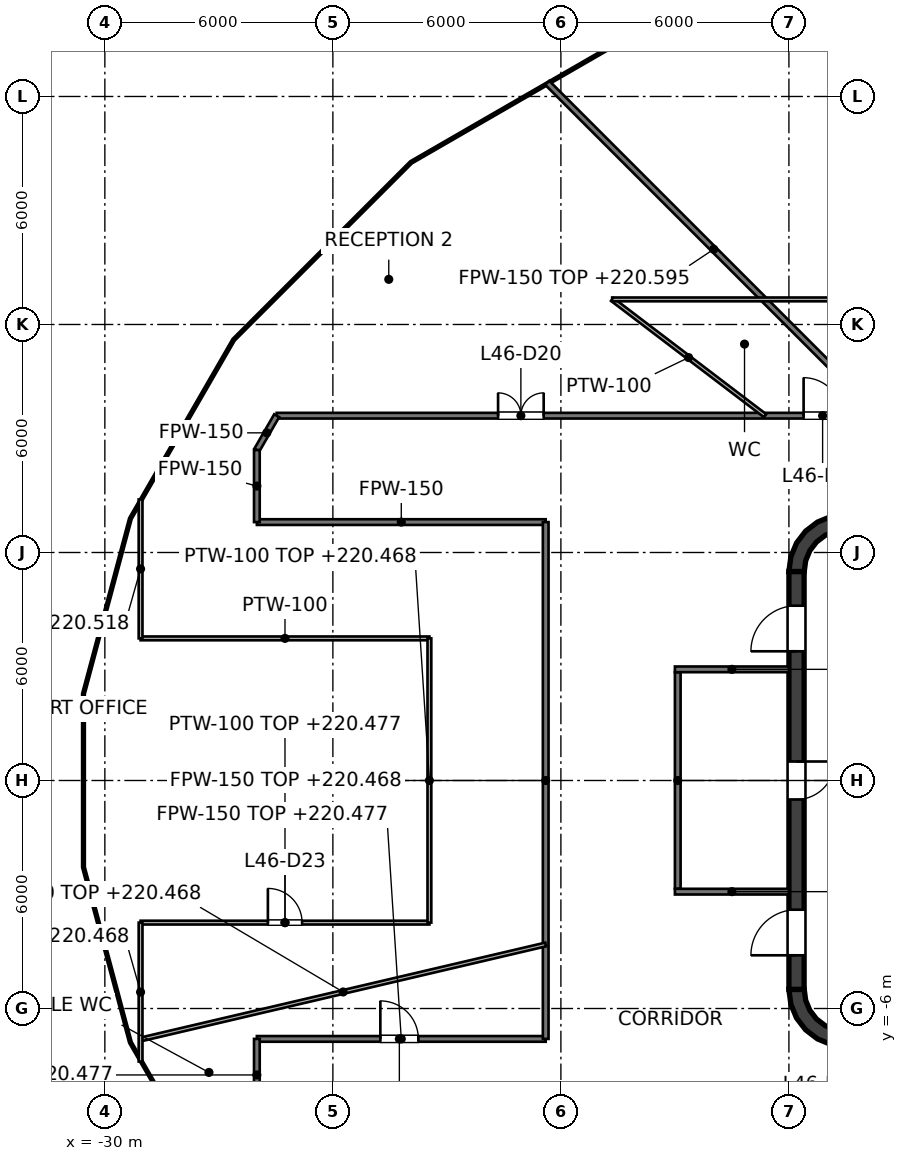
"""IFC4 building model, lengths in metres.
Left out: names, types, materials, properties, quantities, classifications, styles, units other than length and angle.
Written with IfcOpenShell. Run it as: python <this file> out.ifc"""

import sys

from ifc_helpers import new_model, si_unit, direction, frame, frame_2d, origin, place, context, subcontext, project, spatial, polyline, rectangle, outline, extrude, element, fill, save


model = new_model("IFC4")
c1 = context("Model", 3, precision=1e-05, world=origin(), true_north=direction((0.0, 1.0)))
c2 = subcontext(c1, "Body", "Model", "MODEL_VIEW")
j1 = project(units=[si_unit("LENGTHUNIT", "METRE"), si_unit("PLANEANGLEUNIT", "RADIAN")], contexts=[c1])
p1 = place(None, origin())
s1 = spatial("IfcSite", under=j1, at=p1, CompositionType="ELEMENT")
p2 = place(p1, origin())
s2 = spatial("IfcBuilding", under=s1, at=p2, CompositionType="ELEMENT")
p3 = place(p2, frame((0.0, 0.0, 217.6)))
s3 = spatial("IfcBuildingStorey", under=s2, at=p3, CompositionType="ELEMENT", Elevation=217.6)
p4 = place(p3, frame((-11.8, -5.5, 0.0), z_axis=(0.0, 0.0, 1.0), x_axis=(0.0, 1.0, 0.0)))
e1 = element("IfcWall", 1, at=p4, inside=s3, PredefinedType="SHEAR", context=c2, shape_type="SweptSolid", body=[
    extrude(rectangle(XDim=11.0, YDim=0.4, at=frame_2d((5.5, 0.0))), origin(), (0.0, 0.0, 1.0), 4.0),
])
p5 = place(p4, frame((5.0, 0.0, 0.0)))
e2 = element("IfcOpeningElement", 2, at=p5, cuts=e1, PredefinedType="OPENING", context=c2, shape_type="SweptSolid", body=[
    extrude(rectangle(XDim=1.0, YDim=2.1, at=frame_2d((0.5, 1.05))), frame((0.0, 0.2, 0.0), z_axis=(0.0, -1.0, 0.0), x_axis=(1.0, 0.0, 0.0)), (0.0, 0.0, 1.0), 0.4),
])
p6 = place(p4, frame((0.9, 0.0, 0.0)))
e3 = element("IfcOpeningElement", 3, at=p6, cuts=e1, PredefinedType="OPENING", context=c2, shape_type="SweptSolid", body=[
    extrude(rectangle(XDim=1.2, YDim=2.1, at=frame_2d((0.6, 1.05))), frame((0.0, 0.2, 0.0), z_axis=(0.0, -1.0, 0.0), x_axis=(1.0, 0.0, 0.0)), (0.0, 0.0, 1.0), 0.4),
])
p7 = place(p4, frame((8.9, 0.0, 0.0)))
e4 = element("IfcOpeningElement", 4, at=p7, cuts=e1, PredefinedType="OPENING", context=c2, shape_type="SweptSolid", body=[
    extrude(rectangle(XDim=1.2, YDim=2.1, at=frame_2d((0.6, 1.05))), frame((0.0, 0.2, 0.0), z_axis=(0.0, -1.0, 0.0), x_axis=(1.0, 0.0, 0.0)), (0.0, 0.0, 1.0), 0.4),
])
p8 = place(p3, origin())
e5 = element("IfcWall", 5, at=p8, inside=s3, PredefinedType="SHEAR", context=c2, shape_type="SweptSolid", body=[
    extrude(outline(polyline([(-12.0, 5.5), (-11.596, 5.5), (-11.559, 5.784), (-11.45, 6.048), (-11.275, 6.275), (-11.048, 6.45), (-10.784, 6.559), (-10.5, 6.596), (-10.5, 7.0), (-10.888, 6.949), (-11.25, 6.799), (-11.561, 6.561), (-11.799, 6.25), (-11.949, 5.888), (-12.0, 5.5)])), origin(), (0.0, 0.0, 1.0), 4.0),
])
e6 = element("IfcWall", 6, at=p8, inside=s3, PredefinedType="SHEAR", context=c2, shape_type="SweptSolid", body=[
    extrude(outline(polyline([(-10.5, -7.0), (-10.5, -6.596), (-10.784, -6.559), (-11.048, -6.45), (-11.275, -6.275), (-11.45, -6.048), (-11.559, -5.784), (-11.596, -5.5), (-12.0, -5.5), (-11.949, -5.888), (-11.799, -6.25), (-11.561, -6.561), (-11.25, -6.799), (-10.888, -6.949), (-10.5, -7.0)])), origin(), (0.0, 0.0, 1.0), 4.0),
])
p9 = place(p3, frame((-14.925, -2.85, 0.0), z_axis=(0.0, 0.0, 1.0), x_axis=(0.0, 1.0, 0.0)))
e7 = element("IfcWall", 7, at=p9, inside=s3, PredefinedType="PARTITIONING", context=c2, shape_type="SweptSolid", body=[
    extrude(rectangle(XDim=5.7, YDim=0.15, at=frame_2d((2.85, 0.0))), origin(), (0.0, 0.0, 1.0), 2.868),
])
p10 = place(p3, frame((-15.0, 2.925, 0.0), z_axis=(0.0, 0.0, 1.0), x_axis=(1.0, 0.0, 0.0)))
e8 = element("IfcWall", 8, at=p10, inside=s3, PredefinedType="PARTITIONING", context=c2, shape_type="SweptSolid", body=[
    extrude(rectangle(XDim=3.0, YDim=0.15, at=frame_2d((1.5, 0.0))), origin(), (0.0, 0.0, 1.0), 2.918),
])
p11 = place(p3, frame((-15.0, -2.925, 0.0), z_axis=(0.0, 0.0, 1.0), x_axis=(1.0, 0.0, 0.0)))
e9 = element("IfcWall", 9, at=p11, inside=s3, PredefinedType="PARTITIONING", context=c2, shape_type="SweptSolid", body=[
    extrude(rectangle(XDim=3.0, YDim=0.15, at=frame_2d((1.5, 0.0))), origin(), (0.0, 0.0, 1.0), 2.868),
])
p12 = place(p3, frame((-18.359, 18.359, 0.0), z_axis=(0.0, 0.0, 1.0), x_axis=(0.707106781187, -0.707106781187, 0.0)))
e10 = element("IfcWall", 10, at=p12, inside=s3, PredefinedType="PARTITIONING", context=c2, shape_type="SweptSolid", body=[
    extrude(rectangle(XDim=12.387, YDim=0.15, at=frame_2d((6.193, 0.0))), origin(), (0.0, 0.0, 1.0), 2.995),
])
p13 = place(p3, frame((-26.0, -6.8, 0.0), z_axis=(0.0, 0.0, 1.0), x_axis=(1.0, 0.0, 0.0)))
e11 = element("IfcWall", 11, at=p13, inside=s3, PredefinedType="PARTITIONING", context=c2, shape_type="SweptSolid", body=[
    extrude(rectangle(XDim=7.6, YDim=0.15, at=frame_2d((3.8, 0.0))), origin(), (0.0, 0.0, 1.0), 2.877),
])
p14 = place(p13, frame((3.249, 0.0, 0.0)))
e12 = element("IfcOpeningElement", 12, at=p14, cuts=e11, PredefinedType="OPENING", context=c2, shape_type="SweptSolid", body=[
    extrude(rectangle(XDim=1.0, YDim=2.1, at=frame_2d((0.5, 1.05))), frame((0.0, 0.075, 0.0), z_axis=(0.0, -1.0, 0.0), x_axis=(1.0, 0.0, 0.0)), (0.0, 0.0, 1.0), 0.15),
])
p15 = place(p3, frame((-26.0, 6.8, 0.0), z_axis=(0.0, 0.0, 1.0), x_axis=(1.0, 0.0, 0.0)))
e13 = element("IfcWall", 13, at=p15, inside=s3, PredefinedType="PARTITIONING", context=c2, shape_type="SweptSolid", body=[
    extrude(rectangle(XDim=7.6, YDim=0.15, at=frame_2d((3.8, 0.0))), origin(), (0.0, 0.0, 1.0), 2.927),
])
p16 = place(p3, frame((-25.479, 9.6, 0.0), z_axis=(0.0, 0.0, 1.0), x_axis=(1.0, 0.0, 0.0)))
e14 = element("IfcWall", 14, at=p16, inside=s3, PredefinedType="PARTITIONING", context=c2, shape_type="SweptSolid", body=[
    extrude(rectangle(XDim=50.958, YDim=0.15, at=frame_2d((25.479, 0.0))), origin(), (0.0, 0.0, 1.0), 2.918),
])
p17 = place(p16, frame((28.474, 0.0, 0.0)))
e15 = element("IfcOpeningElement", 15, at=p17, cuts=e14, PredefinedType="OPENING", context=c2, shape_type="SweptSolid", body=[
    extrude(rectangle(XDim=1.0, YDim=2.1, at=frame_2d((0.5, 1.05))), frame((0.0, 0.075, 0.0), z_axis=(0.0, -1.0, 0.0), x_axis=(1.0, 0.0, 0.0)), (0.0, 0.0, 1.0), 0.15),
])
p18 = place(p16, frame((24.607, 0.0, 0.0)))
e16 = element("IfcOpeningElement", 16, at=p18, cuts=e14, PredefinedType="OPENING", context=c2, shape_type="SweptSolid", body=[
    extrude(rectangle(XDim=1.0, YDim=2.1, at=frame_2d((0.5, 1.05))), frame((0.0, 0.075, 0.0), z_axis=(0.0, -1.0, 0.0), x_axis=(1.0, 0.0, 0.0)), (0.0, 0.0, 1.0), 0.15),
])
p19 = place(p16, frame((19.083, 0.0, 0.0)))
e17 = element("IfcOpeningElement", 17, at=p19, cuts=e14, PredefinedType="OPENING", context=c2, shape_type="SweptSolid", body=[
    extrude(rectangle(XDim=1.0, YDim=2.1, at=frame_2d((0.5, 1.05))), frame((0.0, 0.075, 0.0), z_axis=(0.0, -1.0, 0.0), x_axis=(1.0, 0.0, 0.0)), (0.0, 0.0, 1.0), 0.15),
])
p20 = place(p16, frame((13.865, 0.0, 0.0)))
e18 = element("IfcOpeningElement", 18, at=p20, cuts=e14, PredefinedType="OPENING", context=c2, shape_type="SweptSolid", body=[
    extrude(rectangle(XDim=1.0, YDim=2.1, at=frame_2d((0.5, 1.05))), frame((0.0, 0.075, 0.0), z_axis=(0.0, -1.0, 0.0), x_axis=(1.0, 0.0, 0.0)), (0.0, 0.0, 1.0), 0.15),
])
p21 = place(p16, frame((5.826, 0.0, 0.0)))
e19 = element("IfcOpeningElement", 19, at=p21, cuts=e14, PredefinedType="OPENING", context=c2, shape_type="SweptSolid", body=[
    extrude(rectangle(XDim=1.2, YDim=2.1, at=frame_2d((0.6, 1.05))), frame((0.0, 0.075, 0.0), z_axis=(0.0, -1.0, 0.0), x_axis=(1.0, 0.0, 0.0)), (0.0, 0.0, 1.0), 0.15),
])
p22 = place(p16, frame((38.532, 0.0, 0.0)))
e20 = element("IfcOpeningElement", 20, at=p22, cuts=e14, PredefinedType="OPENING", context=c2, shape_type="SweptSolid", body=[
    extrude(rectangle(XDim=1.0, YDim=2.1, at=frame_2d((0.5, 1.05))), frame((0.0, 0.075, 0.0), z_axis=(0.0, -1.0, 0.0), x_axis=(1.0, 0.0, 0.0)), (0.0, 0.0, 1.0), 0.15),
])
p23 = place(p3, frame((-26.0, 8.697, 0.0), z_axis=(0.0, 0.0, 1.0), x_axis=(0.499817072756, 0.866130991122, 0.0)))
e21 = element("IfcWall", 21, at=p23, inside=s3, PredefinedType="PARTITIONING", context=c2, shape_type="SweptSolid", body=[
    extrude(rectangle(XDim=1.042, YDim=0.15, at=frame_2d((0.521, 0.0))), origin(), (0.0, 0.0, 1.0), 2.927),
])
p24 = place(p3, frame((-18.4, -6.8, 0.0), z_axis=(0.0, 0.0, 1.0), x_axis=(0.0, 1.0, 0.0)))
e22 = element("IfcWall", 22, at=p24, inside=s3, PredefinedType="PARTITIONING", context=c2, shape_type="SweptSolid", body=[
    extrude(rectangle(XDim=13.6, YDim=0.15, at=frame_2d((6.8, 0.0))), origin(), (0.0, 0.0, 1.0), 2.868),
])
p25 = place(p3, frame((-26.0, -8.697, 0.0), z_axis=(0.0, 0.0, 1.0), x_axis=(0.0, 1.0, 0.0)))
e23 = element("IfcWall", 23, at=p25, inside=s3, PredefinedType="PARTITIONING", context=c2, shape_type="SweptSolid", body=[
    extrude(rectangle(XDim=1.897, YDim=0.15, at=frame_2d((0.948, 0.0))), origin(), (0.0, 0.0, 1.0), 2.877),
])
p26 = place(p3, frame((-26.0, 6.8, 0.0), z_axis=(0.0, 0.0, 1.0), x_axis=(0.0, 1.0, 0.0)))
e24 = element("IfcWall", 24, at=p26, inside=s3, PredefinedType="PARTITIONING", context=c2, shape_type="SweptSolid", body=[
    extrude(rectangle(XDim=1.897, YDim=0.15, at=frame_2d((0.948, 0.0))), origin(), (0.0, 0.0, 1.0), 2.927),
])
p27 = place(p3, frame((-16.651, 12.66, 0.0), z_axis=(0.0, 0.0, 1.0), x_axis=(0.796006750332, -0.605287744322, 0.0)))
e25 = element("IfcWall", 25, at=p27, inside=s3, PredefinedType="PARTITIONING", context=c2, shape_type="SweptSolid", body=[
    extrude(rectangle(XDim=5.055, YDim=0.1, at=frame_2d((2.528, 0.0))), origin(), (0.0, 0.0, 1.0), 2.927),
])
p28 = place(p3, frame((-29.06, -3.74, 0.0), z_axis=(0.0, 0.0, 1.0), x_axis=(1.0, 0.0, 0.0)))
e26 = element("IfcWall", 26, at=p28, inside=s3, PredefinedType="PARTITIONING", context=c2, shape_type="SweptSolid", body=[
    extrude(rectangle(XDim=7.6, YDim=0.1, at=frame_2d((3.8, 0.0))), origin(), (0.0, 0.0, 1.0), 2.877),
])
p29 = place(p28, frame((3.35, 0.0, 0.0)))
e27 = element("IfcOpeningElement", 27, at=p29, cuts=e26, PredefinedType="OPENING", context=c2, shape_type="SweptSolid", body=[
    extrude(rectangle(XDim=0.9, YDim=2.1, at=frame_2d((0.45, 1.05))), frame((0.0, 0.05, 0.0), z_axis=(0.0, -1.0, 0.0), x_axis=(1.0, 0.0, 0.0)), (0.0, 0.0, 1.0), 0.1),
])
p30 = place(p3, frame((-29.06, 3.74, 0.0), z_axis=(0.0, 0.0, 1.0), x_axis=(1.0, 0.0, 0.0)))
e28 = element("IfcWall", 28, at=p30, inside=s3, PredefinedType="PARTITIONING", context=c2, shape_type="SweptSolid", body=[
    extrude(rectangle(XDim=7.6, YDim=0.1, at=frame_2d((3.8, 0.0))), origin(), (0.0, 0.0, 1.0), 2.927),
])
p31 = place(p3, frame((-16.651, 12.66, 0.0), z_axis=(0.0, 0.0, 1.0), x_axis=(1.0, 0.0, 0.0)))
e29 = element("IfcWall", 29, at=p31, inside=s3, PredefinedType="PARTITIONING", context=c2, shape_type="SweptSolid", body=[
    extrude(rectangle(XDim=42.229, YDim=0.1, at=frame_2d((21.114, 0.0))), origin(), (0.0, 0.0, 1.0), 2.918),
])
p32 = place(p31, frame((8.027, 0.0, 0.0)))
e30 = element("IfcOpeningElement", 30, at=p32, cuts=e29, PredefinedType="OPENING", context=c2, shape_type="SweptSolid", body=[
    extrude(rectangle(XDim=1.8, YDim=2.1, at=frame_2d((0.9, 1.05))), frame((0.0, 0.05, 0.0), z_axis=(0.0, -1.0, 0.0), x_axis=(1.0, 0.0, 0.0)), (0.0, 0.0, 1.0), 0.1),
])
p33 = place(p31, frame((32.595, 0.0, 0.0)))
e31 = element("IfcOpeningElement", 31, at=p33, cuts=e29, PredefinedType="OPENING", context=c2, shape_type="SweptSolid", body=[
    extrude(rectangle(XDim=0.9, YDim=2.1, at=frame_2d((0.45, 1.05))), frame((0.0, 0.05, 0.0), z_axis=(0.0, -1.0, 0.0), x_axis=(1.0, 0.0, 0.0)), (0.0, 0.0, 1.0), 0.1),
])
p34 = place(p3, frame((-29.06, -6.815, 0.0), z_axis=(0.0, 0.0, 1.0), x_axis=(0.973585340427, 0.22832342172, 0.0)))
e32 = element("IfcWall", 32, at=p34, inside=s3, PredefinedType="PARTITIONING", context=c2, shape_type="SweptSolid", body=[
    extrude(rectangle(XDim=10.949, YDim=0.1, at=frame_2d((5.475, 0.0))), origin(), (0.0, 0.0, 1.0), 2.868),
])
p35 = place(p3, frame((-21.46, -3.74, 0.0), z_axis=(0.0, 0.0, 1.0), x_axis=(0.0, 1.0, 0.0)))
e33 = element("IfcWall", 33, at=p35, inside=s3, PredefinedType="PARTITIONING", context=c2, shape_type="SweptSolid", body=[
    extrude(rectangle(XDim=7.48, YDim=0.1, at=frame_2d((3.74, 0.0))), origin(), (0.0, 0.0, 1.0), 2.868),
])
p36 = place(p3, frame((-29.06, -7.396, 0.0), z_axis=(0.0, 0.0, 1.0), x_axis=(0.0, 1.0, 0.0)))
e34 = element("IfcWall", 34, at=p36, inside=s3, PredefinedType="PARTITIONING", context=c2, shape_type="SweptSolid", body=[
    extrude(rectangle(XDim=3.656, YDim=0.1, at=frame_2d((1.828, 0.0))), origin(), (0.0, 0.0, 1.0), 2.868),
])
p37 = place(p3, frame((-29.06, 3.74, 0.0), z_axis=(0.0, 0.0, 1.0), x_axis=(0.0, 1.0, 0.0)))
e35 = element("IfcWall", 35, at=p37, inside=s3, PredefinedType="PARTITIONING", context=c2, shape_type="SweptSolid", body=[
    extrude(rectangle(XDim=3.656, YDim=0.1, at=frame_2d((1.828, 0.0))), origin(), (0.0, 0.0, 1.0), 2.918),
])
p38 = place(p5, origin())
e36 = element("IfcDoor", 36, at=p38, inside=s3, OperationType="SINGLE_SWING_RIGHT", PredefinedType="DOOR", context=c2, shape_type="SweptSolid", body=[
    extrude(rectangle(XDim=1.0, YDim=2.1, at=frame_2d((0.5, 1.05))), frame((0.0, 0.025, 0.0), z_axis=(0.0, -1.0, 0.0), x_axis=(1.0, 0.0, 0.0)), (0.0, 0.0, 1.0), 0.05),
])
fill(e2, e36)
p39 = place(p6, origin())
e37 = element("IfcDoor", 37, at=p39, inside=s3, OperationType="SINGLE_SWING_LEFT", PredefinedType="DOOR", context=c2, shape_type="SweptSolid", body=[
    extrude(rectangle(XDim=1.2, YDim=2.1, at=frame_2d((0.6, 1.05))), frame((0.0, 0.025, 0.0), z_axis=(0.0, -1.0, 0.0), x_axis=(1.0, 0.0, 0.0)), (0.0, 0.0, 1.0), 0.05),
])
fill(e3, e37)
p40 = place(p7, origin())
e38 = element("IfcDoor", 38, at=p40, inside=s3, OperationType="SINGLE_SWING_LEFT", PredefinedType="DOOR", context=c2, shape_type="SweptSolid", body=[
    extrude(rectangle(XDim=1.2, YDim=2.1, at=frame_2d((0.6, 1.05))), frame((0.0, 0.025, 0.0), z_axis=(0.0, -1.0, 0.0), x_axis=(1.0, 0.0, 0.0)), (0.0, 0.0, 1.0), 0.05),
])
fill(e4, e38)
p41 = place(p20, origin())
e39 = element("IfcDoor", 39, at=p41, inside=s3, OperationType="SINGLE_SWING_LEFT", PredefinedType="DOOR", context=c2, shape_type="SweptSolid", body=[
    extrude(rectangle(XDim=1.0, YDim=2.1, at=frame_2d((0.5, 1.05))), frame((0.0, 0.025, 0.0), z_axis=(0.0, -1.0, 0.0), x_axis=(1.0, 0.0, 0.0)), (0.0, 0.0, 1.0), 0.05),
])
fill(e18, e39)
p42 = place(p21, origin())
e40 = element("IfcDoor", 40, at=p42, inside=s3, OperationType="DOUBLE_DOOR_SINGLE_SWING", PredefinedType="DOOR", context=c2, shape_type="SweptSolid", body=[
    extrude(rectangle(XDim=1.2, YDim=2.1, at=frame_2d((0.6, 1.05))), frame((0.0, 0.025, 0.0), z_axis=(0.0, -1.0, 0.0), x_axis=(1.0, 0.0, 0.0)), (0.0, 0.0, 1.0), 0.05),
])
fill(e19, e40)
p43 = place(p14, origin())
e41 = element("IfcDoor", 41, at=p43, inside=s3, OperationType="SINGLE_SWING_LEFT", PredefinedType="DOOR", context=c2, shape_type="SweptSolid", body=[
    extrude(rectangle(XDim=1.0, YDim=2.1, at=frame_2d((0.5, 1.05))), frame((0.0, 0.025, 0.0), z_axis=(0.0, -1.0, 0.0), x_axis=(1.0, 0.0, 0.0)), (0.0, 0.0, 1.0), 0.05),
])
fill(e12, e41)
p44 = place(p29, origin())
e42 = element("IfcDoor", 42, at=p44, inside=s3, OperationType="SINGLE_SWING_LEFT", PredefinedType="DOOR", context=c2, shape_type="SweptSolid", body=[
    extrude(rectangle(XDim=0.9, YDim=2.1, at=frame_2d((0.45, 1.05))), frame((0.0, 0.025, 0.0), z_axis=(0.0, -1.0, 0.0), x_axis=(1.0, 0.0, 0.0)), (0.0, 0.0, 1.0), 0.05),
])
fill(e27, e42)
save(model, sys.argv[1])
